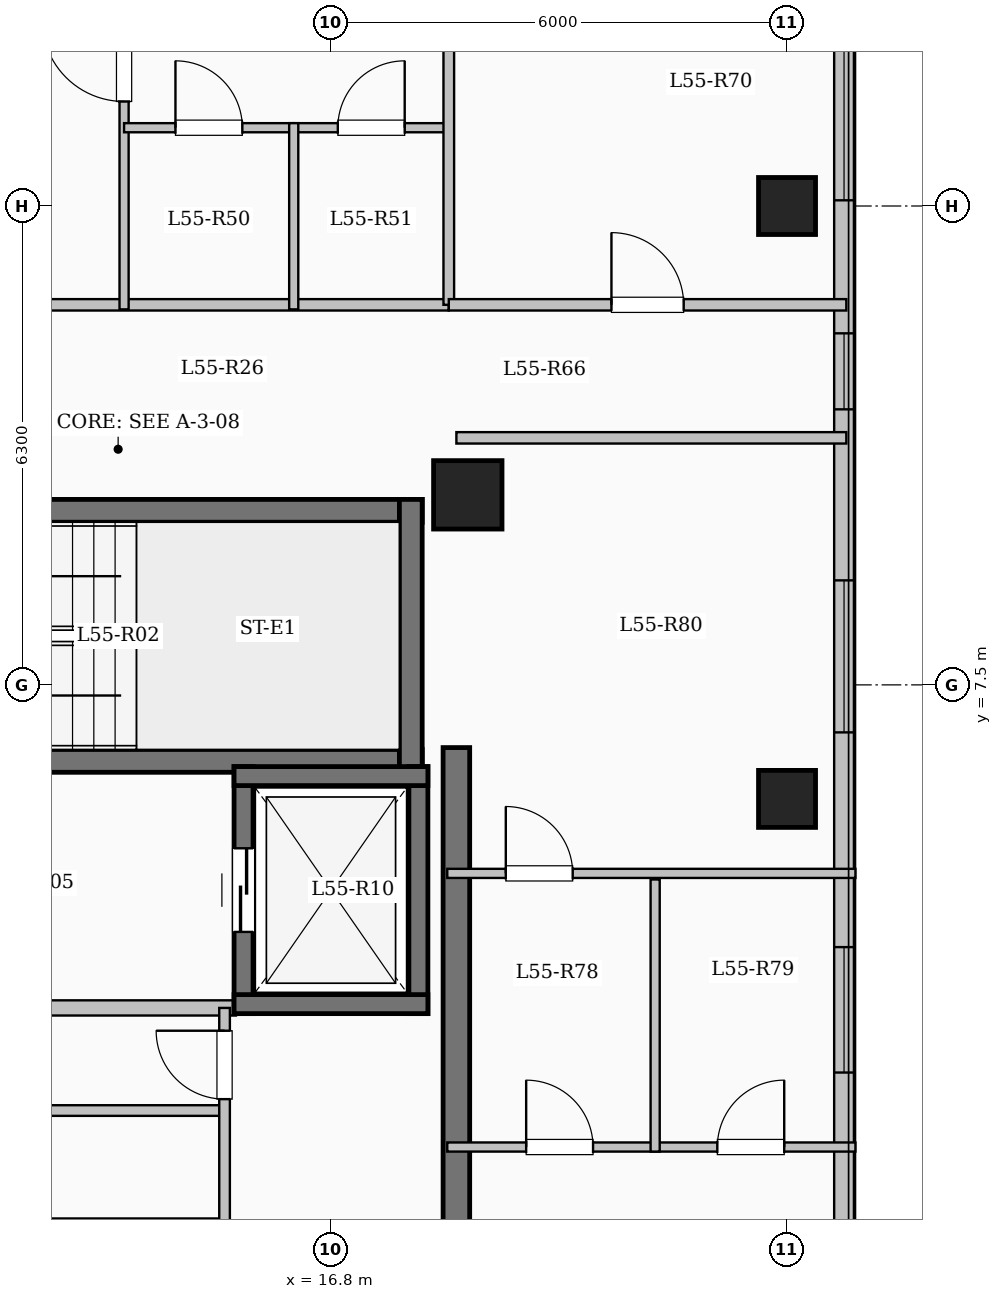
"""IFC4 building model, lengths in metres.
Left out: names, types, materials, properties, quantities, classifications, styles, units other than length and angle.
Written with IfcOpenShell. Run it as: python <this file> out.ifc"""

import sys

from ifc_helpers import new_model, si_unit, direction, frame, frame_2d, origin, origin_2d, place, context, subcontext, project, spatial, rectangle, extrude, element, fill, save


model = new_model("IFC4")
c1 = context("Model", 3, precision=1e-05, world=origin(), true_north=direction((0.0, 1.0)))
c2 = subcontext(c1, "Body", "Model", "MODEL_VIEW")
j1 = project(units=[si_unit("LENGTHUNIT", "METRE"), si_unit("PLANEANGLEUNIT", "RADIAN")], contexts=[c1])
p1 = place(None, origin())
s1 = spatial("IfcSite", under=j1, at=p1, CompositionType="ELEMENT")
p2 = place(p1, origin())
s2 = spatial("IfcBuilding", under=s1, at=p2, CompositionType="ELEMENT")
p3 = place(p2, frame((0.0, 0.0, 203.65)))
s3 = spatial("IfcBuildingStorey", under=s2, at=p3, CompositionType="ELEMENT", Elevation=203.65)
p4 = place(p3, frame((18.6, 10.0, 0.0), z_axis=(0.0, 0.0, 1.0), x_axis=(1.0, 0.0, 0.0)))
e1 = element("IfcColumn", 1, at=p4, inside=s3, PredefinedType="COLUMN", context=c2, shape_type="SweptSolid", body=[
    extrude(rectangle(XDim=0.9, YDim=0.9, at=origin_2d()), origin(), (0.0, 0.0, 1.0), 3.35),
])
for number, where, z_axis, x_axis in (
    (2, (22.8, 6.0, 0.0), (0.0, 0.0, 1.0), (1.0, 0.0, 0.0)),
    (3, (22.8, 13.8, 0.0), (0.0, 0.0, 1.0), (1.0, 0.0, 0.0)),
):
    element("IfcColumn", number, at=place(p3, frame(where, z_axis=z_axis, x_axis=x_axis)), inside=s3, PredefinedType="COLUMN", context=c2, shape_type="SweptSolid", body=[
        extrude(rectangle(XDim=0.75, YDim=0.75, at=origin_2d()), origin(), (0.0, 0.0, 1.0), 3.35),
    ])
p5 = place(p3, frame((23.55, 17.25, 0.0), z_axis=(0.0, 0.0, 1.0), x_axis=(0.0, -1.0, 0.0)))
e4 = element("IfcWall", 4, at=p5, inside=s3, PredefinedType="SOLIDWALL", context=c2, shape_type="SweptSolid", body=[
    extrude(rectangle(XDim=34.5, YDim=0.26, at=frame_2d((17.25, 0.0))), origin(), (0.0, 0.0, 1.0), 3.1),
])
p6 = place(p5, frame((1.375, 0.0, 0.9)))
e5 = element("IfcOpeningElement", 5, at=p6, cuts=e4, PredefinedType="OPENING", context=c2, shape_type="SweptSolid", body=[
    extrude(rectangle(XDim=2.0, YDim=1.7, at=frame_2d((1.0, 0.85))), frame((0.0, 0.14, 0.0), z_axis=(0.0, -1.0, 0.0), x_axis=(1.0, 0.0, 0.0)), (0.0, 0.0, 1.0), 0.28),
])
p7 = place(p5, frame((5.125, 0.0, 0.95)))
e6 = element("IfcOpeningElement", 6, at=p7, cuts=e4, PredefinedType="OPENING", context=c2, shape_type="SweptSolid", body=[
    extrude(rectangle(XDim=1.0, YDim=1.5, at=frame_2d((0.5, 0.75))), frame((0.0, 0.14, 0.0), z_axis=(0.0, -1.0, 0.0), x_axis=(1.0, 0.0, 0.0)), (0.0, 0.0, 1.0), 0.28),
])
p8 = place(p5, frame((8.375, 0.0, 0.9)))
e7 = element("IfcOpeningElement", 7, at=p8, cuts=e4, PredefinedType="OPENING", context=c2, shape_type="SweptSolid", body=[
    extrude(rectangle(XDim=2.0, YDim=1.7, at=frame_2d((1.0, 0.85))), frame((0.0, 0.14, 0.0), z_axis=(0.0, -1.0, 0.0), x_axis=(1.0, 0.0, 0.0)), (0.0, 0.0, 1.0), 0.28),
])
p9 = place(p5, frame((13.2, 0.0, 0.9)))
e8 = element("IfcOpeningElement", 8, at=p9, cuts=e4, PredefinedType="OPENING", context=c2, shape_type="SweptSolid", body=[
    extrude(rectangle(XDim=1.65, YDim=1.6, at=frame_2d((0.825, 0.8))), frame((0.0, 0.14, 0.0), z_axis=(0.0, -1.0, 0.0), x_axis=(1.0, 0.0, 0.0)), (0.0, 0.0, 1.0), 0.28),
])
p10 = place(p5, frame((19.05, 0.0, 0.9)))
e9 = element("IfcOpeningElement", 9, at=p10, cuts=e4, PredefinedType="OPENING", context=c2, shape_type="SweptSolid", body=[
    extrude(rectangle(XDim=2.2, YDim=1.75, at=frame_2d((1.1, 0.875))), frame((0.0, 0.14, 0.0), z_axis=(0.0, -1.0, 0.0), x_axis=(1.0, 0.0, 0.0)), (0.0, 0.0, 1.0), 0.28),
])
p11 = place(p5, frame((24.975, 0.0, 0.95)))
e10 = element("IfcOpeningElement", 10, at=p11, cuts=e4, PredefinedType="OPENING", context=c2, shape_type="SweptSolid", body=[
    extrude(rectangle(XDim=1.2, YDim=1.5, at=frame_2d((0.6, 0.75))), frame((0.0, 0.14, 0.0), z_axis=(0.0, -1.0, 0.0), x_axis=(1.0, 0.0, 0.0)), (0.0, 0.0, 1.0), 0.28),
])
p12 = place(p5, frame((29.475, 0.0, 0.9)))
e11 = element("IfcOpeningElement", 11, at=p12, cuts=e4, PredefinedType="OPENING", context=c2, shape_type="SweptSolid", body=[
    extrude(rectangle(XDim=2.2, YDim=1.75, at=frame_2d((1.1, 0.875))), frame((0.0, 0.14, 0.0), z_axis=(0.0, -1.0, 0.0), x_axis=(1.0, 0.0, 0.0)), (0.0, 0.0, 1.0), 0.28),
])
p13 = place(p3, frame((10.0, 9.79, 0.0), z_axis=(0.0, 0.0, 1.0), x_axis=(1.0, 0.0, 0.0)))
e12 = element("IfcWall", 12, at=p13, inside=s3, PredefinedType="SHEAR", context=c2, shape_type="SweptSolid", body=[
    extrude(rectangle(XDim=8.0, YDim=0.3, at=frame_2d((4.0, 0.0))), origin(), (0.0, 0.0, 1.0), 3.35),
])
p14 = place(p3, frame((10.0, 6.5, 0.0), z_axis=(0.0, 0.0, 1.0), x_axis=(1.0, 0.0, 0.0)))
e13 = element("IfcWall", 13, at=p14, inside=s3, PredefinedType="SHEAR", context=c2, shape_type="SweptSolid", body=[
    extrude(rectangle(XDim=8.0, YDim=0.3, at=frame_2d((4.0, 0.0))), origin(), (0.0, 0.0, 1.0), 3.35),
])
p15 = place(p14, frame((0.55, 0.0, 0.0)))
e14 = element("IfcOpeningElement", 14, at=p15, cuts=e13, PredefinedType="OPENING", context=c2, shape_type="SweptSolid", body=[
    extrude(rectangle(XDim=1.0, YDim=2.15, at=frame_2d((0.5, 1.075))), frame((0.0, 0.16, 0.0), z_axis=(0.0, -1.0, 0.0), x_axis=(1.0, 0.0, 0.0)), (0.0, 0.0, 1.0), 0.32),
])
p16 = place(p3, frame((17.85, 6.35, 0.0), z_axis=(0.0, 0.0, 1.0), x_axis=(0.0, 1.0, 0.0)))
e15 = element("IfcWall", 15, at=p16, inside=s3, PredefinedType="SHEAR", context=c2, shape_type="SweptSolid", body=[
    extrude(rectangle(XDim=3.59, YDim=0.3, at=frame_2d((1.795, 0.0))), origin(), (0.0, 0.0, 1.0), 3.35),
])
p17 = place(p3, frame((10.15, 3.25, 0.0), z_axis=(0.0, 0.0, 1.0), x_axis=(1.0, 0.0, 0.0)))
e16 = element("IfcWall", 16, at=p17, inside=s3, PredefinedType="SOLIDWALL", context=c2, shape_type="SweptSolid", body=[
    extrude(rectangle(XDim=5.4, YDim=0.2, at=frame_2d((2.7, 0.0))), origin(), (0.0, 0.0, 1.0), 3.1),
])
p18 = place(p3, frame((15.65, 3.175, 0.0), z_axis=(0.0, 0.0, 1.0), x_axis=(0.0, 1.0, 0.0)))
e17 = element("IfcWall", 17, at=p18, inside=s3, PredefinedType="SHEAR", context=c2, shape_type="SweptSolid", body=[
    extrude(rectangle(XDim=3.25, YDim=0.25, at=frame_2d((1.625, 0.0))), origin(), (0.0, 0.0, 1.0), 3.35),
])
p19 = place(p18, frame((1.075, 0.0, 0.0)))
e18 = element("IfcOpeningElement", 18, at=p19, cuts=e17, PredefinedType="OPENING", context=c2, shape_type="SweptSolid", body=[
    extrude(rectangle(XDim=1.1, YDim=2.15, at=frame_2d((0.55, 1.075))), frame((0.0, 0.135, 0.0), z_axis=(0.0, -1.0, 0.0), x_axis=(1.0, 0.0, 0.0)), (0.0, 0.0, 1.0), 0.27),
])
p20 = place(p3, frame((17.95, 3.175, 0.0), z_axis=(0.0, 0.0, 1.0), x_axis=(0.0, 1.0, 0.0)))
e19 = element("IfcWall", 19, at=p20, inside=s3, PredefinedType="SHEAR", context=c2, shape_type="SweptSolid", body=[
    extrude(rectangle(XDim=3.25, YDim=0.25, at=frame_2d((1.625, 0.0))), origin(), (0.0, 0.0, 1.0), 3.35),
])
for number, where, z_axis, x_axis in (
    (20, (15.525, 3.3, 0.0), (0.0, 0.0, 1.0), (1.0, 0.0, 0.0)),
    (21, (15.525, 6.3, 0.0), (0.0, 0.0, 1.0), (1.0, 0.0, 0.0)),
):
    element("IfcWall", number, at=place(p3, frame(where, z_axis=z_axis, x_axis=x_axis)), inside=s3, PredefinedType="SHEAR", context=c2, shape_type="SweptSolid", body=[
        extrude(rectangle(XDim=2.55, YDim=0.25, at=frame_2d((1.275, 0.0))), origin(), (0.0, 0.0, 1.0), 3.35),
    ])
p21 = place(p3, frame((18.45, -7.375, 0.0), z_axis=(0.0, 0.0, 1.0), x_axis=(0.0, 1.0, 0.0)))
e22 = element("IfcWall", 22, at=p21, inside=s3, PredefinedType="SHEAR", context=c2, shape_type="SweptSolid", body=[
    extrude(rectangle(XDim=14.05, YDim=0.35, at=frame_2d((7.025, 0.0))), origin(), (0.0, 0.0, 1.0), 3.35),
])
p22 = place(p3, frame((12.8, 1.9, 0.0), z_axis=(0.0, 0.0, 1.0), x_axis=(1.0, 0.0, 0.0)))
e23 = element("IfcWall", 23, at=p22, inside=s3, PredefinedType="PARTITIONING", context=c2, shape_type="SweptSolid", body=[
    extrude(rectangle(XDim=2.6, YDim=0.14, at=frame_2d((1.3, 0.0))), origin(), (0.0, 0.0, 1.0), 3.1),
])
p23 = place(p3, frame((15.4, -7.2, 0.0), z_axis=(0.0, 0.0, 1.0), x_axis=(0.0, 1.0, 0.0)))
e24 = element("IfcWall", 24, at=p23, inside=s3, PredefinedType="PARTITIONING", context=c2, shape_type="SweptSolid", body=[
    extrude(rectangle(XDim=10.45, YDim=0.14, at=frame_2d((5.225, 0.0))), origin(), (0.0, 0.0, 1.0), 3.1),
])
p24 = place(p23, frame((9.25, 0.0, 0.0)))
e25 = element("IfcOpeningElement", 25, at=p24, cuts=e24, PredefinedType="OPENING", context=c2, shape_type="SweptSolid", body=[
    extrude(rectangle(XDim=0.9, YDim=2.08, at=frame_2d((0.45, 1.04))), frame((0.0, 0.08, 0.0), z_axis=(0.0, -1.0, 0.0), x_axis=(1.0, 0.0, 0.0)), (0.0, 0.0, 1.0), 0.16),
])
p25 = place(p3, frame((3.85, 12.5, 0.0), z_axis=(0.0, 0.0, 1.0), x_axis=(1.0, 0.0, 0.0)))
e26 = element("IfcWall", 26, at=p25, inside=s3, PredefinedType="PARTITIONING", context=c2, shape_type="SweptSolid", body=[
    extrude(rectangle(XDim=14.5, YDim=0.15, at=frame_2d((7.25, 0.0))), origin(), (0.0, 0.0, 1.0), 3.1),
])
p26 = place(p25, frame((0.7, 0.0, 0.0)))
e27 = element("IfcOpeningElement", 27, at=p26, cuts=e26, PredefinedType="OPENING", context=c2, shape_type="SweptSolid", body=[
    extrude(rectangle(XDim=0.96, YDim=2.15, at=frame_2d((0.48, 1.075))), frame((0.0, 0.085, 0.0), z_axis=(0.0, -1.0, 0.0), x_axis=(1.0, 0.0, 0.0)), (0.0, 0.0, 1.0), 0.17),
])
p27 = place(p25, frame((6.656, 0.0, 0.0)))
e28 = element("IfcOpeningElement", 28, at=p27, cuts=e26, PredefinedType="OPENING", context=c2, shape_type="SweptSolid", body=[
    extrude(rectangle(XDim=0.96, YDim=2.15, at=frame_2d((0.48, 1.075))), frame((0.0, 0.085, 0.0), z_axis=(0.0, -1.0, 0.0), x_axis=(1.0, 0.0, 0.0)), (0.0, 0.0, 1.0), 0.17),
])
p28 = place(p3, frame((14.078, 12.44, 0.0), z_axis=(0.0, 0.0, 1.0), x_axis=(0.0, 1.0, 0.0)))
e29 = element("IfcWall", 29, at=p28, inside=s3, PredefinedType="PARTITIONING", context=c2, shape_type="SweptSolid", body=[
    extrude(rectangle(XDim=8.46, YDim=0.12, at=frame_2d((4.23, 0.0))), origin(), (0.0, 0.0, 1.0), 3.1),
])
p29 = place(p28, frame((2.735, 0.0, 0.0)))
e30 = element("IfcOpeningElement", 30, at=p29, cuts=e29, PredefinedType="OPENING", context=c2, shape_type="SweptSolid", body=[
    extrude(rectangle(XDim=1.08, YDim=2.15, at=frame_2d((0.54, 1.075))), frame((0.0, 0.07, 0.0), z_axis=(0.0, -1.0, 0.0), x_axis=(1.0, 0.0, 0.0)), (0.0, 0.0, 1.0), 0.14),
])
p30 = place(p3, frame((14.078, 14.83, 0.0), z_axis=(0.0, 0.0, 1.0), x_axis=(1.0, 0.0, 0.0)))
e31 = element("IfcWall", 31, at=p30, inside=s3, PredefinedType="PARTITIONING", context=c2, shape_type="SweptSolid", body=[
    extrude(rectangle(XDim=2.232, YDim=0.12, at=frame_2d((1.116, 0.0))), origin(), (0.0, 0.0, 1.0), 3.1),
])
p31 = place(p30, frame((0.676, 0.0, 0.0)))
e32 = element("IfcOpeningElement", 32, at=p31, cuts=e31, PredefinedType="OPENING", context=c2, shape_type="SweptSolid", body=[
    extrude(rectangle(XDim=0.88, YDim=2.1, at=frame_2d((0.44, 1.05))), frame((0.0, 0.07, 0.0), z_axis=(0.0, -1.0, 0.0), x_axis=(1.0, 0.0, 0.0)), (0.0, 0.0, 1.0), 0.14),
])
p32 = place(p3, frame((16.31, 14.83, 0.0), z_axis=(0.0, 0.0, 1.0), x_axis=(1.0, 0.0, 0.0)))
e33 = element("IfcWall", 33, at=p32, inside=s3, PredefinedType="PARTITIONING", context=c2, shape_type="SweptSolid", body=[
    extrude(rectangle(XDim=2.04, YDim=0.12, at=frame_2d((1.02, 0.0))), origin(), (0.0, 0.0, 1.0), 3.1),
])
p33 = place(p32, frame((0.58, 0.0, 0.0)))
e34 = element("IfcOpeningElement", 34, at=p33, cuts=e33, PredefinedType="OPENING", context=c2, shape_type="SweptSolid", body=[
    extrude(rectangle(XDim=0.88, YDim=2.1, at=frame_2d((0.44, 1.05))), frame((0.0, 0.07, 0.0), z_axis=(0.0, -1.0, 0.0), x_axis=(1.0, 0.0, 0.0)), (0.0, 0.0, 1.0), 0.14),
])
p34 = place(p3, frame((16.31, 12.44, 0.0), z_axis=(0.0, 0.0, 1.0), x_axis=(0.0, 1.0, 0.0)))
e35 = element("IfcWall", 35, at=p34, inside=s3, PredefinedType="PARTITIONING", context=c2, shape_type="SweptSolid", body=[
    extrude(rectangle(XDim=2.45, YDim=0.12, at=frame_2d((1.225, 0.0))), origin(), (0.0, 0.0, 1.0), 3.1),
])
p35 = place(p3, frame((18.45, 10.75, 0.0), z_axis=(0.0, 0.0, 1.0), x_axis=(1.0, 0.0, 0.0)))
e36 = element("IfcWall", 36, at=p35, inside=s3, PredefinedType="PARTITIONING", context=c2, shape_type="SweptSolid", body=[
    extrude(rectangle(XDim=5.13, YDim=0.15, at=frame_2d((2.565, 0.0))), origin(), (0.0, 0.0, 1.0), 3.1),
])
p36 = place(p3, frame((18.35, 12.5, 0.0), z_axis=(0.0, 0.0, 1.0), x_axis=(0.0, 1.0, 0.0)))
e37 = element("IfcWall", 37, at=p36, inside=s3, PredefinedType="PARTITIONING", context=c2, shape_type="SweptSolid", body=[
    extrude(rectangle(XDim=4.75, YDim=0.14, at=frame_2d((2.375, 0.0))), origin(), (0.0, 0.0, 1.0), 3.1),
])
p37 = place(p3, frame((18.35, 12.5, 0.0), z_axis=(0.0, 0.0, 1.0), x_axis=(1.0, 0.0, 0.0)))
e38 = element("IfcWall", 38, at=p37, inside=s3, PredefinedType="PARTITIONING", context=c2, shape_type="SweptSolid", body=[
    extrude(rectangle(XDim=5.23, YDim=0.15, at=frame_2d((2.615, 0.0))), origin(), (0.0, 0.0, 1.0), 3.1),
])
p38 = place(p37, frame((2.14, 0.0, 0.0)))
e39 = element("IfcOpeningElement", 39, at=p38, cuts=e38, PredefinedType="OPENING", context=c2, shape_type="SweptSolid", body=[
    extrude(rectangle(XDim=0.95, YDim=2.15, at=frame_2d((0.475, 1.075))), frame((0.0, 0.085, 0.0), z_axis=(0.0, -1.0, 0.0), x_axis=(1.0, 0.0, 0.0)), (0.0, 0.0, 1.0), 0.17),
])
p39 = place(p3, frame((18.33, 1.42, 0.0), z_axis=(0.0, 0.0, 1.0), x_axis=(1.0, 0.0, 0.0)))
e40 = element("IfcWall", 40, at=p39, inside=s3, PredefinedType="PARTITIONING", context=c2, shape_type="SweptSolid", body=[
    extrude(rectangle(XDim=5.37, YDim=0.12, at=frame_2d((2.685, 0.0))), origin(), (0.0, 0.0, 1.0), 3.1),
])
p40 = place(p39, frame((1.038, 0.0, 0.0)))
e41 = element("IfcOpeningElement", 41, at=p40, cuts=e40, PredefinedType="OPENING", context=c2, shape_type="SweptSolid", body=[
    extrude(rectangle(XDim=0.88, YDim=2.1, at=frame_2d((0.44, 1.05))), frame((0.0, 0.07, 0.0), z_axis=(0.0, -1.0, 0.0), x_axis=(1.0, 0.0, 0.0)), (0.0, 0.0, 1.0), 0.14),
])
p41 = place(p39, frame((3.553, 0.0, 0.0)))
e42 = element("IfcOpeningElement", 42, at=p41, cuts=e40, PredefinedType="OPENING", context=c2, shape_type="SweptSolid", body=[
    extrude(rectangle(XDim=0.88, YDim=2.1, at=frame_2d((0.44, 1.05))), frame((0.0, 0.07, 0.0), z_axis=(0.0, -1.0, 0.0), x_axis=(1.0, 0.0, 0.0)), (0.0, 0.0, 1.0), 0.14),
])
p42 = place(p3, frame((18.33, 5.02, 0.0), z_axis=(0.0, 0.0, 1.0), x_axis=(1.0, 0.0, 0.0)))
e43 = element("IfcWall", 43, at=p42, inside=s3, PredefinedType="PARTITIONING", context=c2, shape_type="SweptSolid", body=[
    extrude(rectangle(XDim=5.37, YDim=0.12, at=frame_2d((2.685, 0.0))), origin(), (0.0, 0.0, 1.0), 3.1),
])
p43 = place(p42, frame((0.77, 0.0, 0.0)))
e44 = element("IfcOpeningElement", 44, at=p43, cuts=e43, PredefinedType="OPENING", context=c2, shape_type="SweptSolid", body=[
    extrude(rectangle(XDim=0.88, YDim=2.1, at=frame_2d((0.44, 1.05))), frame((0.0, 0.07, 0.0), z_axis=(0.0, -1.0, 0.0), x_axis=(1.0, 0.0, 0.0)), (0.0, 0.0, 1.0), 0.14),
])
p44 = place(p3, frame((21.065, 1.36, 0.0), z_axis=(0.0, 0.0, 1.0), x_axis=(0.0, 1.0, 0.0)))
e45 = element("IfcWall", 45, at=p44, inside=s3, PredefinedType="PARTITIONING", context=c2, shape_type="SweptSolid", body=[
    extrude(rectangle(XDim=3.58, YDim=0.12, at=frame_2d((1.79, 0.0))), origin(), (0.0, 0.0, 1.0), 3.1),
])
p45 = place(p6, origin())
e46 = element("IfcWindow", 46, at=p45, inside=s3, PartitioningType="SINGLE_PANEL", PredefinedType="WINDOW", context=c2, shape_type="SweptSolid", body=[
    extrude(rectangle(XDim=2.0, YDim=1.7, at=frame_2d((1.0, 0.85))), frame((0.0, 0.03, 0.0), z_axis=(0.0, -1.0, 0.0), x_axis=(1.0, 0.0, 0.0)), (0.0, 0.0, 1.0), 0.06),
])
fill(e5, e46)
p46 = place(p7, origin())
e47 = element("IfcWindow", 47, at=p46, inside=s3, PartitioningType="SINGLE_PANEL", PredefinedType="WINDOW", context=c2, shape_type="SweptSolid", body=[
    extrude(rectangle(XDim=1.0, YDim=1.5, at=frame_2d((0.5, 0.75))), frame((0.0, 0.03, 0.0), z_axis=(0.0, -1.0, 0.0), x_axis=(1.0, 0.0, 0.0)), (0.0, 0.0, 1.0), 0.06),
])
fill(e6, e47)
p47 = place(p8, origin())
e48 = element("IfcWindow", 48, at=p47, inside=s3, PartitioningType="SINGLE_PANEL", PredefinedType="WINDOW", context=c2, shape_type="SweptSolid", body=[
    extrude(rectangle(XDim=2.0, YDim=1.7, at=frame_2d((1.0, 0.85))), frame((0.0, 0.03, 0.0), z_axis=(0.0, -1.0, 0.0), x_axis=(1.0, 0.0, 0.0)), (0.0, 0.0, 1.0), 0.06),
])
fill(e7, e48)
p48 = place(p9, origin())
e49 = element("IfcWindow", 49, at=p48, inside=s3, PartitioningType="SINGLE_PANEL", PredefinedType="WINDOW", context=c2, shape_type="SweptSolid", body=[
    extrude(rectangle(XDim=1.65, YDim=1.6, at=frame_2d((0.825, 0.8))), frame((0.0, 0.03, 0.0), z_axis=(0.0, -1.0, 0.0), x_axis=(1.0, 0.0, 0.0)), (0.0, 0.0, 1.0), 0.06),
])
fill(e8, e49)
p49 = place(p19, origin())
e50 = element("IfcDoor", 50, at=p49, inside=s3, OperationType="SLIDING_TO_LEFT", PredefinedType="DOOR", context=c2, shape_type="SweptSolid", body=[
    extrude(rectangle(XDim=1.1, YDim=2.15, at=frame_2d((0.55, 1.075))), frame((0.0, 0.025, 0.0), z_axis=(0.0, -1.0, 0.0), x_axis=(1.0, 0.0, 0.0)), (0.0, 0.0, 1.0), 0.05),
])
fill(e18, e50)
p50 = place(p24, origin())
e51 = element("IfcDoor", 51, at=p50, inside=s3, OperationType="SINGLE_SWING_RIGHT", PredefinedType="DOOR", context=c2, shape_type="SweptSolid", body=[
    extrude(rectangle(XDim=0.9, YDim=2.08, at=frame_2d((0.45, 1.04))), frame((0.0, 0.025, 0.0), z_axis=(0.0, -1.0, 0.0), x_axis=(1.0, 0.0, 0.0)), (0.0, 0.0, 1.0), 0.05),
])
fill(e25, e51)
p51 = place(p29, origin())
e52 = element("IfcDoor", 52, at=p51, inside=s3, OperationType="SINGLE_SWING_RIGHT", PredefinedType="DOOR", context=c2, shape_type="SweptSolid", body=[
    extrude(rectangle(XDim=1.08, YDim=2.15, at=frame_2d((0.54, 1.075))), frame((0.0, 0.025, 0.0), z_axis=(0.0, -1.0, 0.0), x_axis=(1.0, 0.0, 0.0)), (0.0, 0.0, 1.0), 0.05),
])
fill(e30, e52)
p52 = place(p31, origin())
e53 = element("IfcDoor", 53, at=p52, inside=s3, OperationType="SINGLE_SWING_LEFT", PredefinedType="DOOR", context=c2, shape_type="SweptSolid", body=[
    extrude(rectangle(XDim=0.88, YDim=2.1, at=frame_2d((0.44, 1.05))), frame((0.0, 0.025, 0.0), z_axis=(0.0, -1.0, 0.0), x_axis=(1.0, 0.0, 0.0)), (0.0, 0.0, 1.0), 0.05),
])
fill(e32, e53)
p53 = place(p33, origin())
e54 = element("IfcDoor", 54, at=p53, inside=s3, OperationType="SINGLE_SWING_RIGHT", PredefinedType="DOOR", context=c2, shape_type="SweptSolid", body=[
    extrude(rectangle(XDim=0.88, YDim=2.1, at=frame_2d((0.44, 1.05))), frame((0.0, 0.025, 0.0), z_axis=(0.0, -1.0, 0.0), x_axis=(1.0, 0.0, 0.0)), (0.0, 0.0, 1.0), 0.05),
])
fill(e34, e54)
p54 = place(p38, origin())
e55 = element("IfcDoor", 55, at=p54, inside=s3, OperationType="SINGLE_SWING_LEFT", PredefinedType="DOOR", context=c2, shape_type="SweptSolid", body=[
    extrude(rectangle(XDim=0.95, YDim=2.15, at=frame_2d((0.475, 1.075))), frame((0.0, 0.025, 0.0), z_axis=(0.0, -1.0, 0.0), x_axis=(1.0, 0.0, 0.0)), (0.0, 0.0, 1.0), 0.05),
])
fill(e39, e55)
p55 = place(p40, origin())
e56 = element("IfcDoor", 56, at=p55, inside=s3, OperationType="SINGLE_SWING_LEFT", PredefinedType="DOOR", context=c2, shape_type="SweptSolid", body=[
    extrude(rectangle(XDim=0.88, YDim=2.1, at=frame_2d((0.44, 1.05))), frame((0.0, 0.025, 0.0), z_axis=(0.0, -1.0, 0.0), x_axis=(1.0, 0.0, 0.0)), (0.0, 0.0, 1.0), 0.05),
])
fill(e41, e56)
p56 = place(p41, origin())
e57 = element("IfcDoor", 57, at=p56, inside=s3, OperationType="SINGLE_SWING_RIGHT", PredefinedType="DOOR", context=c2, shape_type="SweptSolid", body=[
    extrude(rectangle(XDim=0.88, YDim=2.1, at=frame_2d((0.44, 1.05))), frame((0.0, 0.025, 0.0), z_axis=(0.0, -1.0, 0.0), x_axis=(1.0, 0.0, 0.0)), (0.0, 0.0, 1.0), 0.05),
])
fill(e42, e57)
p57 = place(p43, origin())
e58 = element("IfcDoor", 58, at=p57, inside=s3, OperationType="SINGLE_SWING_LEFT", PredefinedType="DOOR", context=c2, shape_type="SweptSolid", body=[
    extrude(rectangle(XDim=0.88, YDim=2.1, at=frame_2d((0.44, 1.05))), frame((0.0, 0.025, 0.0), z_axis=(0.0, -1.0, 0.0), x_axis=(1.0, 0.0, 0.0)), (0.0, 0.0, 1.0), 0.05),
])
fill(e44, e58)
save(model, sys.argv[1])
